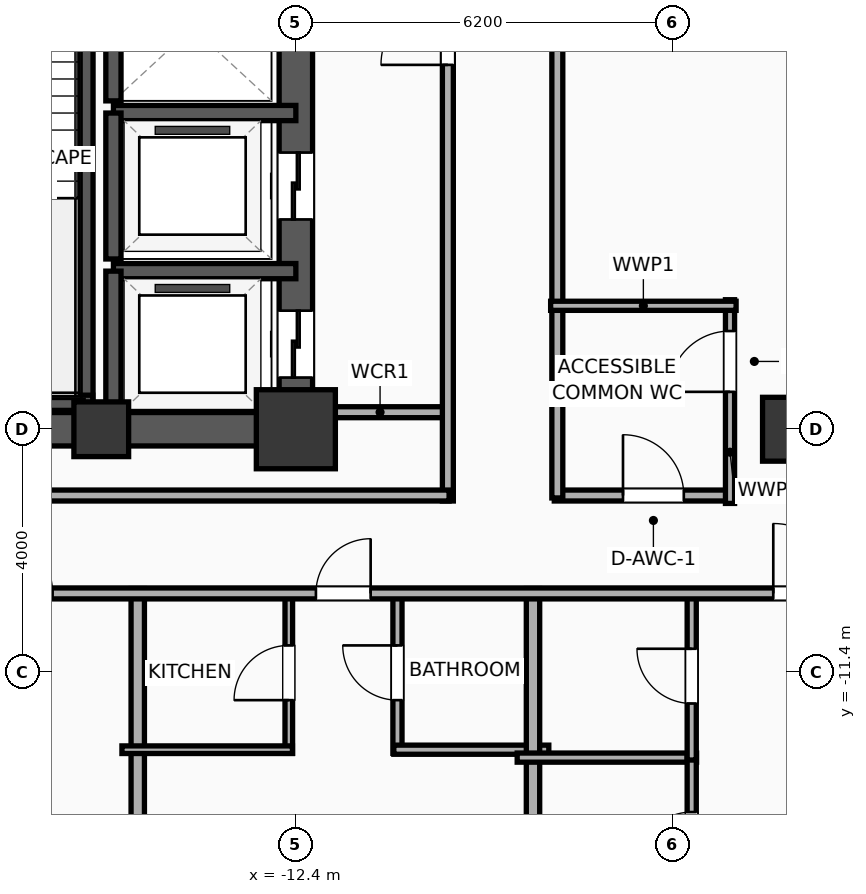
"""IFC4 building model, lengths in metres.
Left out: names, types, materials, properties, quantities, classifications, styles, units other than length and angle.
Written with IfcOpenShell. Run it as: python <this file> out.ifc"""

import sys

from ifc_helpers import new_model, si_unit, direction, frame, frame_2d, origin, origin_2d, place, context, subcontext, project, spatial, rectangle, extrude, element, fill, save


model = new_model("IFC4")
c1 = context("Model", 3, precision=1e-05, world=origin(), true_north=direction((0.0, 1.0)))
c2 = subcontext(c1, "Body", "Model", "MODEL_VIEW")
j1 = project(units=[si_unit("LENGTHUNIT", "METRE"), si_unit("PLANEANGLEUNIT", "RADIAN")], contexts=[c1])
p1 = place(None, origin())
s1 = spatial("IfcSite", under=j1, at=p1, CompositionType="ELEMENT")
p2 = place(p1, origin())
s2 = spatial("IfcBuilding", under=s1, at=p2, CompositionType="ELEMENT")
p3 = place(p2, frame((0.0, 0.0, 128.7)))
s3 = spatial("IfcBuildingStorey", under=s2, at=p3, CompositionType="ELEMENT", Elevation=128.7)
p4 = place(p3, frame((-15.6, -7.4, 0.0), z_axis=(0.0, 0.0, 1.0), x_axis=(1.0, 0.0, 0.0)))
e1 = element("IfcColumn", 1, at=p4, inside=s3, PredefinedType="COLUMN", context=c2, shape_type="SweptSolid", body=[
    extrude(rectangle(XDim=0.9, YDim=0.9, at=origin_2d()), origin(), (0.0, 0.0, 1.0), 3.9),
])
p5 = place(p3, frame((-12.4, -7.4, 0.0), z_axis=(0.0, 0.0, 1.0), x_axis=(1.0, 0.0, 0.0)))
e2 = element("IfcColumn", 2, at=p5, inside=s3, PredefinedType="COLUMN", context=c2, shape_type="SweptSolid", body=[
    extrude(rectangle(XDim=1.3, YDim=1.3, at=origin_2d()), origin(), (0.0, 0.0, 1.0), 3.9),
])
p6 = place(p3, frame((-19.475, -7.4, 0.0), z_axis=(0.0, 0.0, 1.0), x_axis=(1.0, 0.0, 0.0)))
e3 = element("IfcWall", 3, at=p6, inside=s3, PredefinedType="SHEAR", context=c2, shape_type="SweptSolid", body=[
    extrude(rectangle(XDim=7.35, YDim=0.55, at=frame_2d((3.675, 0.0))), origin(), (0.0, 0.0, 1.0), 3.65),
])
p7 = place(p3, frame((-12.4, -7.4, 0.0), z_axis=(0.0, 0.0, 1.0), x_axis=(0.0, 1.0, 0.0)))
e4 = element("IfcWall", 4, at=p7, inside=s3, PredefinedType="SHEAR", context=c2, shape_type="SweptSolid", body=[
    extrude(rectangle(XDim=14.8, YDim=0.55, at=frame_2d((7.4, 0.0))), origin(), (0.0, 0.0, 1.0), 3.65),
])
p8 = place(p7, frame((0.85, 0.0, 0.0)))
e5 = element("IfcOpeningElement", 5, at=p8, cuts=e4, PredefinedType="OPENING", context=c2, shape_type="SweptSolid", body=[
    extrude(rectangle(XDim=1.1, YDim=2.05, at=frame_2d((0.55, 1.025))), frame((0.0, 0.285, 0.0), z_axis=(0.0, -1.0, 0.0), x_axis=(1.0, 0.0, 0.0)), (0.0, 0.0, 1.0), 0.57),
])
p9 = place(p7, frame((3.45, 0.0, 0.0)))
e6 = element("IfcOpeningElement", 6, at=p9, cuts=e4, PredefinedType="OPENING", context=c2, shape_type="SweptSolid", body=[
    extrude(rectangle(XDim=1.1, YDim=2.05, at=frame_2d((0.55, 1.025))), frame((0.0, 0.285, 0.0), z_axis=(0.0, -1.0, 0.0), x_axis=(1.0, 0.0, 0.0)), (0.0, 0.0, 1.0), 0.57),
])
p10 = place(p7, frame((10.53, 0.0, 0.0)))
e7 = element("IfcOpeningElement", 7, at=p10, cuts=e4, PredefinedType="OPENING", context=c2, shape_type="SweptSolid", body=[
    extrude(rectangle(XDim=1.1, YDim=2.05, at=frame_2d((0.55, 1.025))), frame((0.0, 0.285, 0.0), z_axis=(0.0, -1.0, 0.0), x_axis=(1.0, 0.0, 0.0)), (0.0, 0.0, 1.0), 0.57),
])
p11 = place(p3, frame((-15.86, -7.085, 0.0), z_axis=(0.0, 0.0, 1.0), x_axis=(0.0, 1.0, 0.0)))
e8 = element("IfcWall", 8, at=p11, inside=s3, PredefinedType="SOLIDWALL", context=c2, shape_type="SweptSolid", body=[
    extrude(rectangle(XDim=7.685, YDim=0.25, at=frame_2d((3.843, 0.0))), origin(), (0.0, 0.0, 1.0), 3.65),
])
p12 = place(p3, frame((-19.2, -6.965, 0.0), z_axis=(0.0, 0.0, 1.0), x_axis=(1.0, 0.0, 0.0)))
e9 = element("IfcWall", 9, at=p12, inside=s3, PredefinedType="SOLIDWALL", context=c2, shape_type="SweptSolid", body=[
    extrude(rectangle(XDim=3.46, YDim=0.25, at=frame_2d((1.73, 0.0))), origin(), (0.0, 0.0, 1.0), 3.65),
])
p13 = place(p3, frame((-4.2, -7.4, 0.0), z_axis=(0.0, 0.0, 1.0), x_axis=(1.0, 0.0, 0.0)))
e10 = element("IfcColumn", 10, at=p13, inside=s3, PredefinedType="COLUMN", context=c2, shape_type="SweptSolid", body=[
    extrude(rectangle(XDim=1.05, YDim=1.05, at=origin_2d()), origin(), (0.0, 0.0, 1.0), 3.9),
])
p14 = place(p3, frame((-12.4, -4.8, 0.0), z_axis=(0.0, 0.0, 1.0), x_axis=(-1.0, 0.0, 0.0)))
e11 = element("IfcWall", 11, at=p14, inside=s3, PredefinedType="SOLIDWALL", context=c2, shape_type="SweptSolid", body=[
    extrude(rectangle(XDim=3.0, YDim=0.25, at=frame_2d((1.5, 0.0))), origin(), (0.0, 0.0, 1.0), 3.65),
])
p15 = place(p3, frame((-15.4, -4.8, 0.0), z_axis=(0.0, 0.0, 1.0), x_axis=(0.0, -1.0, 0.0)))
e12 = element("IfcWall", 12, at=p15, inside=s3, PredefinedType="SOLIDWALL", context=c2, shape_type="SweptSolid", body=[
    extrude(rectangle(XDim=2.6, YDim=0.25, at=frame_2d((1.3, 0.0))), origin(), (0.0, 0.0, 1.0), 3.65),
])
p16 = place(p3, frame((-12.4, -2.2, 0.0), z_axis=(0.0, 0.0, 1.0), x_axis=(-1.0, 0.0, 0.0)))
e13 = element("IfcWall", 13, at=p16, inside=s3, PredefinedType="SOLIDWALL", context=c2, shape_type="SweptSolid", body=[
    extrude(rectangle(XDim=3.0, YDim=0.25, at=frame_2d((1.5, 0.0))), origin(), (0.0, 0.0, 1.0), 3.65),
])
p17 = place(p3, frame((-15.4, -2.2, 0.0), z_axis=(0.0, 0.0, 1.0), x_axis=(0.0, -1.0, 0.0)))
e14 = element("IfcWall", 14, at=p17, inside=s3, PredefinedType="SOLIDWALL", context=c2, shape_type="SweptSolid", body=[
    extrude(rectangle(XDim=2.4, YDim=0.25, at=frame_2d((1.2, 0.0))), origin(), (0.0, 0.0, 1.0), 3.65),
])
p18 = place(p3, frame((-15.4, 0.4, 0.0), z_axis=(0.0, 0.0, 1.0), x_axis=(0.0, -1.0, 0.0)))
e15 = element("IfcWall", 15, at=p18, inside=s3, PredefinedType="SOLIDWALL", context=c2, shape_type="SweptSolid", body=[
    extrude(rectangle(XDim=2.4, YDim=0.25, at=frame_2d((1.2, 0.0))), origin(), (0.0, 0.0, 1.0), 3.65),
])
p19 = place(p3, frame((-12.15, -7.12, 0.0), z_axis=(0.0, 0.0, 1.0), x_axis=(1.0, 0.0, 0.0)))
e16 = element("IfcWall", 16, at=p19, inside=s3, PredefinedType="PARTITIONING", context=c2, shape_type="SweptSolid", body=[
    extrude(rectangle(XDim=2.27, YDim=0.18, at=frame_2d((1.135, 0.0))), origin(), (0.0, 0.0, 1.0), 3.65),
])
p20 = place(p3, frame((-9.9, -8.58, 0.0), z_axis=(0.0, 0.0, 1.0), x_axis=(0.0, 1.0, 0.0)))
e17 = element("IfcWall", 17, at=p20, inside=s3, PredefinedType="PARTITIONING", context=c2, shape_type="SweptSolid", body=[
    extrude(rectangle(XDim=17.16, YDim=0.18, at=frame_2d((8.58, 0.0))), origin(), (0.0, 0.0, 1.0), 3.65),
])
p21 = place(p20, frame((7.172, 0.0, 0.0)))
e18 = element("IfcOpeningElement", 18, at=p21, cuts=e17, PredefinedType="OPENING", context=c2, shape_type="SweptSolid", body=[
    extrude(rectangle(XDim=1.1, YDim=2.05, at=frame_2d((0.55, 1.025))), frame((0.0, 0.1, 0.0), z_axis=(0.0, -1.0, 0.0), x_axis=(1.0, 0.0, 0.0)), (0.0, 0.0, 1.0), 0.2),
])
p22 = place(p3, frame((-29.21, -8.49, 0.0), z_axis=(0.0, 0.0, 1.0), x_axis=(1.0, 0.0, 0.0)))
e19 = element("IfcWall", 19, at=p22, inside=s3, PredefinedType="PARTITIONING", context=c2, shape_type="SweptSolid", body=[
    extrude(rectangle(XDim=19.33, YDim=0.18, at=frame_2d((9.665, 0.0))), origin(), (0.0, 0.0, 1.0), 3.65),
])
p23 = place(p3, frame((-8.15, -8.49, 0.0), z_axis=(0.0, 0.0, 1.0), x_axis=(1.0, 0.0, 0.0)))
e20 = element("IfcWall", 20, at=p23, inside=s3, PredefinedType="PARTITIONING", context=c2, shape_type="SweptSolid", body=[
    extrude(rectangle(XDim=16.3, YDim=0.18, at=frame_2d((8.15, 0.0))), origin(), (0.0, 0.0, 1.0), 3.65),
])
p24 = place(p23, frame((1.13, 0.0, 0.0)))
e21 = element("IfcOpeningElement", 21, at=p24, cuts=e20, PredefinedType="OPENING", context=c2, shape_type="SweptSolid", body=[
    extrude(rectangle(XDim=1.0, YDim=2.05, at=frame_2d((0.5, 1.025))), frame((0.0, 0.1, 0.0), z_axis=(0.0, -1.0, 0.0), x_axis=(1.0, 0.0, 0.0)), (0.0, 0.0, 1.0), 0.2),
])
p25 = place(p23, frame((10.12, 0.0, 0.0)))
e22 = element("IfcOpeningElement", 22, at=p25, cuts=e20, PredefinedType="OPENING", context=c2, shape_type="SweptSolid", body=[
    extrude(rectangle(XDim=0.95, YDim=2.05, at=frame_2d((0.475, 1.025))), frame((0.0, 0.1, 0.0), z_axis=(0.0, -1.0, 0.0), x_axis=(1.0, 0.0, 0.0)), (0.0, 0.0, 1.0), 0.2),
])
p26 = place(p3, frame((-8.1, -8.53, 0.0), z_axis=(0.0, 0.0, 1.0), x_axis=(0.0, 1.0, 0.0)))
e23 = element("IfcWall", 23, at=p26, inside=s3, PredefinedType="PARTITIONING", context=c2, shape_type="SweptSolid", body=[
    extrude(rectangle(XDim=17.06, YDim=0.18, at=frame_2d((8.53, 0.0))), origin(), (0.0, 0.0, 1.0), 3.65),
])
p27 = place(p3, frame((-5.26, -8.62, 0.0), z_axis=(0.0, 0.0, 1.0), x_axis=(0.0, 1.0, 0.0)))
e24 = element("IfcWall", 24, at=p27, inside=s3, PredefinedType="PLUMBINGWALL", context=c2, shape_type="SweptSolid", body=[
    extrude(rectangle(XDim=3.35, YDim=0.15, at=frame_2d((1.675, 0.0))), origin(), (0.0, 0.0, 1.0), 3.65),
])
p28 = place(p27, frame((1.835, 0.0, 0.0)))
e25 = element("IfcOpeningElement", 25, at=p28, cuts=e24, PredefinedType="OPENING", context=c2, shape_type="SweptSolid", body=[
    extrude(rectangle(XDim=1.0, YDim=2.05, at=frame_2d((0.5, 1.025))), frame((0.0, 0.085, 0.0), z_axis=(0.0, -1.0, 0.0), x_axis=(1.0, 0.0, 0.0)), (0.0, 0.0, 1.0), 0.17),
])
p29 = place(p3, frame((-8.21, -5.37, 0.0), z_axis=(0.0, 0.0, 1.0), x_axis=(1.0, 0.0, 0.0)))
e26 = element("IfcWall", 26, at=p29, inside=s3, PredefinedType="PLUMBINGWALL", context=c2, shape_type="SweptSolid", body=[
    extrude(rectangle(XDim=3.05, YDim=0.15, at=frame_2d((1.525, 0.0))), origin(), (0.0, 0.0, 1.0), 3.65),
])
p30 = place(p3, frame((-15.0, -20.41, 0.0), z_axis=(0.0, 0.0, 1.0), x_axis=(0.0, 1.0, 0.0)))
e27 = element("IfcWall", 27, at=p30, inside=s3, PredefinedType="PARTITIONING", context=c2, shape_type="SweptSolid", body=[
    extrude(rectangle(XDim=10.39, YDim=0.22, at=frame_2d((5.195, 0.0))), origin(), (0.0, 0.0, 1.0), 3.04),
])
p31 = place(p3, frame((-12.516, -12.73, 0.0), z_axis=(0.0, 0.0, 1.0), x_axis=(0.0, 1.0, 0.0)))
e28 = element("IfcWall", 28, at=p31, inside=s3, PredefinedType="PARTITIONING", context=c2, shape_type="SweptSolid", body=[
    extrude(rectangle(XDim=2.65, YDim=0.125, at=frame_2d((1.325, 0.0))), origin(), (0.0, 0.0, 1.0), 3.65),
])
p32 = place(p31, frame((0.875, 0.0, 0.0)))
e29 = element("IfcOpeningElement", 29, at=p32, cuts=e28, PredefinedType="OPENING", context=c2, shape_type="SweptSolid", body=[
    extrude(rectangle(XDim=0.9, YDim=2.05, at=frame_2d((0.45, 1.025))), frame((0.0, 0.073, 0.0), z_axis=(0.0, -1.0, 0.0), x_axis=(1.0, 0.0, 0.0)), (0.0, 0.0, 1.0), 0.145),
])
p33 = place(p3, frame((-10.729, -12.73, 0.0), z_axis=(0.0, 0.0, 1.0), x_axis=(0.0, 1.0, 0.0)))
e30 = element("IfcWall", 30, at=p33, inside=s3, PredefinedType="PLUMBINGWALL", context=c2, shape_type="SweptSolid", body=[
    extrude(rectangle(XDim=2.65, YDim=0.15, at=frame_2d((1.325, 0.0))), origin(), (0.0, 0.0, 1.0), 3.65),
])
p34 = place(p33, frame((0.875, 0.0, 0.0)))
e31 = element("IfcOpeningElement", 31, at=p34, cuts=e30, PredefinedType="OPENING", context=c2, shape_type="SweptSolid", body=[
    extrude(rectangle(XDim=0.9, YDim=2.05, at=frame_2d((0.45, 1.025))), frame((0.0, 0.085, 0.0), z_axis=(0.0, -1.0, 0.0), x_axis=(1.0, 0.0, 0.0)), (0.0, 0.0, 1.0), 0.17),
])
p35 = place(p3, frame((-15.26, -12.67, 0.0), z_axis=(0.0, 0.0, 1.0), x_axis=(1.0, 0.0, 0.0)))
e32 = element("IfcWall", 32, at=p35, inside=s3, PredefinedType="PARTITIONING", context=c2, shape_type="SweptSolid", body=[
    extrude(rectangle(XDim=2.804, YDim=0.125, at=frame_2d((1.402, 0.0))), origin(), (0.0, 0.0, 1.0), 3.65),
])
p36 = place(p3, frame((-10.789, -12.67, 0.0), z_axis=(0.0, 0.0, 1.0), x_axis=(1.0, 0.0, 0.0)))
e33 = element("IfcWall", 33, at=p36, inside=s3, PredefinedType="PLUMBINGWALL", context=c2, shape_type="SweptSolid", body=[
    extrude(rectangle(XDim=2.549, YDim=0.15, at=frame_2d((1.274, 0.0))), origin(), (0.0, 0.0, 1.0), 3.65),
])
p37 = place(p3, frame((-8.5, -20.41, 0.0), z_axis=(0.0, 0.0, 1.0), x_axis=(0.0, 1.0, 0.0)))
e34 = element("IfcWall", 34, at=p37, inside=s3, PredefinedType="PARTITIONING", context=c2, shape_type="SweptSolid", body=[
    extrude(rectangle(XDim=10.39, YDim=0.22, at=frame_2d((5.195, 0.0))), origin(), (0.0, 0.0, 1.0), 3.65),
])
p38 = place(p3, frame((-8.76, -12.8, 0.0), z_axis=(0.0, 0.0, 1.0), x_axis=(1.0, 0.0, 0.0)))
e35 = element("IfcWall", 35, at=p38, inside=s3, PredefinedType="PLUMBINGWALL", context=c2, shape_type="SweptSolid", body=[
    extrude(rectangle(XDim=2.95, YDim=0.15, at=frame_2d((1.475, 0.0))), origin(), (0.0, 0.0, 1.0), 3.65),
])
p39 = place(p3, frame((-5.89, -20.458, 0.0), z_axis=(0.0, 0.0, 1.0), x_axis=(0.0, 1.0, 0.0)))
e36 = element("IfcWall", 36, at=p39, inside=s3, PredefinedType="PLUMBINGWALL", context=c2, shape_type="SweptSolid", body=[
    extrude(rectangle(XDim=7.698, YDim=0.15, at=frame_2d((3.849, 0.0))), origin(), (0.0, 0.0, 1.0), 3.65),
])
p40 = place(p39, frame((5.862, 0.0, 0.0)))
e37 = element("IfcOpeningElement", 37, at=p40, cuts=e36, PredefinedType="OPENING", context=c2, shape_type="SweptSolid", body=[
    extrude(rectangle(XDim=0.9, YDim=2.05, at=frame_2d((0.45, 1.025))), frame((0.0, 0.085, 0.0), z_axis=(0.0, -1.0, 0.0), x_axis=(1.0, 0.0, 0.0)), (0.0, 0.0, 1.0), 0.17),
])
p41 = place(p3, frame((-5.89, -12.84, 0.0), z_axis=(0.0, 0.0, 1.0), x_axis=(0.0, 1.0, 0.0)))
e38 = element("IfcWall", 38, at=p41, inside=s3, PredefinedType="PLUMBINGWALL", context=c2, shape_type="SweptSolid", body=[
    extrude(rectangle(XDim=2.76, YDim=0.15, at=frame_2d((1.38, 0.0))), origin(), (0.0, 0.0, 1.0), 3.65),
])
p42 = place(p41, frame((0.93, 0.0, 0.0)))
e39 = element("IfcOpeningElement", 39, at=p42, cuts=e38, PredefinedType="OPENING", context=c2, shape_type="SweptSolid", body=[
    extrude(rectangle(XDim=0.9, YDim=2.05, at=frame_2d((0.45, 1.025))), frame((0.0, 0.085, 0.0), z_axis=(0.0, -1.0, 0.0), x_axis=(1.0, 0.0, 0.0)), (0.0, 0.0, 1.0), 0.17),
])
p43 = place(p3, frame((-29.21, -10.1, 0.0), z_axis=(0.0, 0.0, 1.0), x_axis=(1.0, 0.0, 0.0)))
e40 = element("IfcWall", 40, at=p43, inside=s3, PredefinedType="PARTITIONING", context=c2, shape_type="SweptSolid", body=[
    extrude(rectangle(XDim=62.42, YDim=0.18, at=frame_2d((31.21, 0.0))), origin(), (0.0, 0.0, 1.0), 3.65),
])
p44 = place(p43, frame((3.414, 0.0, 0.0)))
e41 = element("IfcOpeningElement", 41, at=p44, cuts=e40, PredefinedType="OPENING", context=c2, shape_type="SweptSolid", body=[
    extrude(rectangle(XDim=1.15, YDim=2.05, at=frame_2d((0.575, 1.025))), frame((0.0, 0.1, 0.0), z_axis=(0.0, -1.0, 0.0), x_axis=(1.0, 0.0, 0.0)), (0.0, 0.0, 1.0), 0.2),
])
p45 = place(p43, frame((11.659, 0.0, 0.0)))
e42 = element("IfcOpeningElement", 42, at=p45, cuts=e40, PredefinedType="OPENING", context=c2, shape_type="SweptSolid", body=[
    extrude(rectangle(XDim=1.15, YDim=2.05, at=frame_2d((0.575, 1.025))), frame((0.0, 0.1, 0.0), z_axis=(0.0, -1.0, 0.0), x_axis=(1.0, 0.0, 0.0)), (0.0, 0.0, 1.0), 0.2),
])
p46 = place(p43, frame((17.14, 0.0, 0.0)))
e43 = element("IfcOpeningElement", 43, at=p46, cuts=e40, PredefinedType="OPENING", context=c2, shape_type="SweptSolid", body=[
    extrude(rectangle(XDim=0.9, YDim=2.05, at=frame_2d((0.45, 1.025))), frame((0.0, 0.1, 0.0), z_axis=(0.0, -1.0, 0.0), x_axis=(1.0, 0.0, 0.0)), (0.0, 0.0, 1.0), 0.2),
])
p47 = place(p43, frame((24.661, 0.0, 0.0)))
e44 = element("IfcOpeningElement", 44, at=p47, cuts=e40, PredefinedType="OPENING", context=c2, shape_type="SweptSolid", body=[
    extrude(rectangle(XDim=1.15, YDim=2.05, at=frame_2d((0.575, 1.025))), frame((0.0, 0.1, 0.0), z_axis=(0.0, -1.0, 0.0), x_axis=(1.0, 0.0, 0.0)), (0.0, 0.0, 1.0), 0.2),
])
p48 = place(p43, frame((28.644, 0.0, 0.0)))
e45 = element("IfcOpeningElement", 45, at=p48, cuts=e40, PredefinedType="OPENING", context=c2, shape_type="SweptSolid", body=[
    extrude(rectangle(XDim=1.15, YDim=2.05, at=frame_2d((0.575, 1.025))), frame((0.0, 0.1, 0.0), z_axis=(0.0, -1.0, 0.0), x_axis=(1.0, 0.0, 0.0)), (0.0, 0.0, 1.0), 0.2),
])
p49 = place(p43, frame((36.64, 0.0, 0.0)))
e46 = element("IfcOpeningElement", 46, at=p49, cuts=e40, PredefinedType="OPENING", context=c2, shape_type="SweptSolid", body=[
    extrude(rectangle(XDim=0.9, YDim=2.05, at=frame_2d((0.45, 1.025))), frame((0.0, 0.1, 0.0), z_axis=(0.0, -1.0, 0.0), x_axis=(1.0, 0.0, 0.0)), (0.0, 0.0, 1.0), 0.2),
])
p50 = place(p43, frame((41.608, 0.0, 0.0)))
e47 = element("IfcOpeningElement", 47, at=p50, cuts=e40, PredefinedType="OPENING", context=c2, shape_type="SweptSolid", body=[
    extrude(rectangle(XDim=1.15, YDim=2.05, at=frame_2d((0.575, 1.025))), frame((0.0, 0.1, 0.0), z_axis=(0.0, -1.0, 0.0), x_axis=(1.0, 0.0, 0.0)), (0.0, 0.0, 1.0), 0.2),
])
p51 = place(p43, frame((48.194, 0.0, 0.0)))
e48 = element("IfcOpeningElement", 48, at=p51, cuts=e40, PredefinedType="OPENING", context=c2, shape_type="SweptSolid", body=[
    extrude(rectangle(XDim=1.15, YDim=2.05, at=frame_2d((0.575, 1.025))), frame((0.0, 0.1, 0.0), z_axis=(0.0, -1.0, 0.0), x_axis=(1.0, 0.0, 0.0)), (0.0, 0.0, 1.0), 0.2),
])
p52 = place(p43, frame((57.525, 0.0, 0.0)))
e49 = element("IfcOpeningElement", 49, at=p52, cuts=e40, PredefinedType="OPENING", context=c2, shape_type="SweptSolid", body=[
    extrude(rectangle(XDim=1.15, YDim=2.05, at=frame_2d((0.575, 1.025))), frame((0.0, 0.1, 0.0), z_axis=(0.0, -1.0, 0.0), x_axis=(1.0, 0.0, 0.0)), (0.0, 0.0, 1.0), 0.2),
])
p53 = place(p8, origin())
e50 = element("IfcDoor", 50, at=p53, inside=s3, OperationType="SLIDING_TO_LEFT", PredefinedType="DOOR", context=c2, shape_type="SweptSolid", body=[
    extrude(rectangle(XDim=1.1, YDim=2.05, at=frame_2d((0.55, 1.025))), frame((0.0, 0.025, 0.0), z_axis=(0.0, -1.0, 0.0), x_axis=(1.0, 0.0, 0.0)), (0.0, 0.0, 1.0), 0.05),
])
fill(e5, e50)
p54 = place(p9, origin())
e51 = element("IfcDoor", 51, at=p54, inside=s3, OperationType="SLIDING_TO_LEFT", PredefinedType="DOOR", context=c2, shape_type="SweptSolid", body=[
    extrude(rectangle(XDim=1.1, YDim=2.05, at=frame_2d((0.55, 1.025))), frame((0.0, 0.025, 0.0), z_axis=(0.0, -1.0, 0.0), x_axis=(1.0, 0.0, 0.0)), (0.0, 0.0, 1.0), 0.05),
])
fill(e6, e51)
p55 = place(p21, origin())
e52 = element("IfcDoor", 52, at=p55, inside=s3, OperationType="SINGLE_SWING_LEFT", PredefinedType="DOOR", context=c2, shape_type="SweptSolid", body=[
    extrude(rectangle(XDim=1.1, YDim=2.05, at=frame_2d((0.55, 1.025))), frame((0.0, 0.025, 0.0), z_axis=(0.0, -1.0, 0.0), x_axis=(1.0, 0.0, 0.0)), (0.0, 0.0, 1.0), 0.05),
])
fill(e18, e52)
p56 = place(p24, origin())
e53 = element("IfcDoor", 53, at=p56, inside=s3, OperationType="SINGLE_SWING_LEFT", PredefinedType="DOOR", context=c2, shape_type="SweptSolid", body=[
    extrude(rectangle(XDim=1.0, YDim=2.05, at=frame_2d((0.5, 1.025))), frame((0.0, 0.025, 0.0), z_axis=(0.0, -1.0, 0.0), x_axis=(1.0, 0.0, 0.0)), (0.0, 0.0, 1.0), 0.05),
])
fill(e21, e53)
p57 = place(p28, origin())
e54 = element("IfcDoor", 54, at=p57, inside=s3, OperationType="SINGLE_SWING_LEFT", PredefinedType="DOOR", context=c2, shape_type="SweptSolid", body=[
    extrude(rectangle(XDim=1.0, YDim=2.05, at=frame_2d((0.5, 1.025))), frame((0.0, 0.025, 0.0), z_axis=(0.0, -1.0, 0.0), x_axis=(1.0, 0.0, 0.0)), (0.0, 0.0, 1.0), 0.05),
])
fill(e25, e54)
p58 = place(p32, origin())
e55 = element("IfcDoor", 55, at=p58, inside=s3, OperationType="SINGLE_SWING_LEFT", PredefinedType="DOOR", context=c2, shape_type="SweptSolid", body=[
    extrude(rectangle(XDim=0.9, YDim=2.05, at=frame_2d((0.45, 1.025))), frame((0.0, 0.025, 0.0), z_axis=(0.0, -1.0, 0.0), x_axis=(1.0, 0.0, 0.0)), (0.0, 0.0, 1.0), 0.05),
])
fill(e29, e55)
p59 = place(p34, origin())
e56 = element("IfcDoor", 56, at=p59, inside=s3, OperationType="SINGLE_SWING_RIGHT", PredefinedType="DOOR", context=c2, shape_type="SweptSolid", body=[
    extrude(rectangle(XDim=0.9, YDim=2.05, at=frame_2d((0.45, 1.025))), frame((0.0, 0.025, 0.0), z_axis=(0.0, -1.0, 0.0), x_axis=(1.0, 0.0, 0.0)), (0.0, 0.0, 1.0), 0.05),
])
fill(e31, e56)
p60 = place(p40, origin())
e57 = element("IfcDoor", 57, at=p60, inside=s3, OperationType="SINGLE_SWING_LEFT", PredefinedType="DOOR", context=c2, shape_type="SweptSolid", body=[
    extrude(rectangle(XDim=0.9, YDim=2.05, at=frame_2d((0.45, 1.025))), frame((0.0, 0.025, 0.0), z_axis=(0.0, -1.0, 0.0), x_axis=(1.0, 0.0, 0.0)), (0.0, 0.0, 1.0), 0.05),
])
fill(e37, e57)
p61 = place(p42, origin())
e58 = element("IfcDoor", 58, at=p61, inside=s3, OperationType="SINGLE_SWING_RIGHT", PredefinedType="DOOR", context=c2, shape_type="SweptSolid", body=[
    extrude(rectangle(XDim=0.9, YDim=2.05, at=frame_2d((0.45, 1.025))), frame((0.0, 0.025, 0.0), z_axis=(0.0, -1.0, 0.0), x_axis=(1.0, 0.0, 0.0)), (0.0, 0.0, 1.0), 0.05),
])
fill(e39, e58)
p62 = place(p46, origin())
e59 = element("IfcDoor", 59, at=p62, inside=s3, OperationType="SINGLE_SWING_RIGHT", PredefinedType="DOOR", context=c2, shape_type="SweptSolid", body=[
    extrude(rectangle(XDim=0.9, YDim=2.05, at=frame_2d((0.45, 1.025))), frame((0.0, 0.025, 0.0), z_axis=(0.0, -1.0, 0.0), x_axis=(1.0, 0.0, 0.0)), (0.0, 0.0, 1.0), 0.05),
])
fill(e43, e59)
p63 = place(p47, origin())
e60 = element("IfcDoor", 60, at=p63, inside=s3, OperationType="SINGLE_SWING_LEFT", PredefinedType="DOOR", context=c2, shape_type="SweptSolid", body=[
    extrude(rectangle(XDim=1.15, YDim=2.05, at=frame_2d((0.575, 1.025))), frame((0.0, 0.025, 0.0), z_axis=(0.0, -1.0, 0.0), x_axis=(1.0, 0.0, 0.0)), (0.0, 0.0, 1.0), 0.05),
])
fill(e44, e60)
save(model, sys.argv[1])
